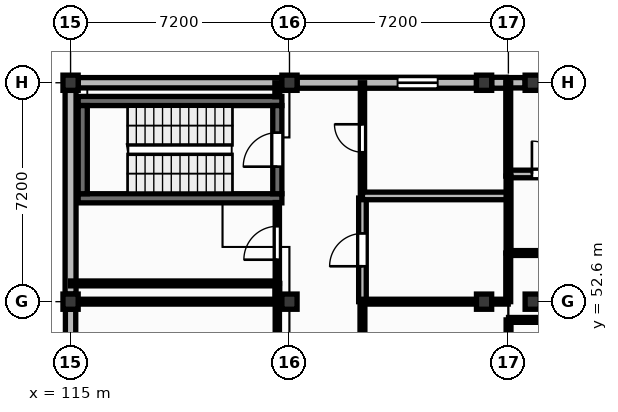
"""IFC4 building model, lengths in metres.
Left out: names, types, materials, properties, quantities, classifications, styles, units other than length and angle.
Written with IfcOpenShell. Run it as: python <this file> out.ifc"""

import sys

from ifc_helpers import new_model, si_unit, direction, frame, frame_2d, origin, origin_2d, place, context, subcontext, project, spatial, rectangle, extrude, element, fill, save


model = new_model("IFC4")
c1 = context("Model", 3, precision=1e-05, world=origin(), true_north=direction((0.0, 1.0)))
c2 = subcontext(c1, "Body", "Model", "MODEL_VIEW")
j1 = project(units=[si_unit("LENGTHUNIT", "METRE"), si_unit("PLANEANGLEUNIT", "RADIAN")], contexts=[c1])
p1 = place(None, origin())
s1 = spatial("IfcSite", under=j1, at=p1, CompositionType="ELEMENT")
p2 = place(p1, origin())
s2 = spatial("IfcBuilding", under=s1, at=p2, CompositionType="ELEMENT")
p3 = place(p2, frame((0.0, 0.0, 4.5)))
s3 = spatial("IfcBuildingStorey", under=s2, at=p3, CompositionType="ELEMENT", Elevation=4.5)
for number, where, z_axis, x_axis in (
    (1, (115.0, 52.6, 0.0), (0.0, 0.0, 1.0), (1.0, 0.0, 0.0)),
    (2, (115.0, 59.8, 0.0), (0.0, 0.0, 1.0), (1.0, 0.0, 0.0)),
    (3, (122.2, 52.6, 0.0), (0.0, 0.0, 1.0), (1.0, 0.0, 0.0)),
    (4, (122.2, 59.8, 0.0), (0.0, 0.0, 1.0), (1.0, 0.0, 0.0)),
    (5, (128.6, 52.6, 0.0), (0.0, 0.0, 1.0), (1.0, 0.0, 0.0)),
    (6, (128.6, 59.8, 0.0), (0.0, 0.0, 1.0), (1.0, 0.0, 0.0)),
    (7, (130.2, 52.6, 0.0), (0.0, 0.0, 1.0), (1.0, 0.0, 0.0)),
    (8, (130.2, 59.8, 0.0), (0.0, 0.0, 1.0), (1.0, 0.0, 0.0)),
):
    element("IfcColumn", number, at=place(p3, frame(where, z_axis=z_axis, x_axis=x_axis)), inside=s3, PredefinedType="COLUMN", context=c2, shape_type="SweptSolid", body=[
        extrude(rectangle(XDim=0.5, YDim=0.5, at=origin_2d()), origin(), (0.0, 0.0, 1.0), 4.22),
    ])
p4 = place(p3, frame((115.0, 45.65, 0.0), z_axis=(0.0, 0.0, 1.0), x_axis=(0.0, 1.0, 0.0)))
e9 = element("IfcWall", 9, at=p4, inside=s3, PredefinedType="SOLIDWALL", context=c2, shape_type="SweptSolid", body=[
    extrude(rectangle(XDim=6.7, YDim=0.34, at=frame_2d((3.35, 0.0))), origin(), (0.0, 0.0, 1.0), 3.52),
])
p5 = place(p4, frame((0.863, 0.0, 1.5)))
e10 = element("IfcOpeningElement", 10, at=p5, cuts=e9, PredefinedType="OPENING", context=c2, shape_type="SweptSolid", body=[
    extrude(rectangle(XDim=1.32, YDim=1.25, at=frame_2d((0.66, 0.625))), frame((0.0, 0.18, 0.0), z_axis=(0.0, -1.0, 0.0), x_axis=(1.0, 0.0, 0.0)), (0.0, 0.0, 1.0), 0.36),
])
p6 = place(p4, frame((3.703, 0.0, 1.05)))
e11 = element("IfcOpeningElement", 11, at=p6, cuts=e9, PredefinedType="OPENING", context=c2, shape_type="SweptSolid", body=[
    extrude(rectangle(XDim=2.1, YDim=1.65, at=frame_2d((1.05, 0.825))), frame((0.0, 0.18, 0.0), z_axis=(0.0, -1.0, 0.0), x_axis=(1.0, 0.0, 0.0)), (0.0, 0.0, 1.0), 0.36),
])
p7 = place(p3, frame((115.25, 59.8, 0.0), z_axis=(0.0, 0.0, 1.0), x_axis=(1.0, 0.0, 0.0)))
e12 = element("IfcWall", 12, at=p7, inside=s3, PredefinedType="SOLIDWALL", context=c2, shape_type="SweptSolid", body=[
    extrude(rectangle(XDim=6.7, YDim=0.34, at=frame_2d((3.35, 0.0))), origin(), (0.0, 0.0, 1.0), 3.52),
])
p8 = place(p3, frame((115.0, 52.85, 0.0), z_axis=(0.0, 0.0, 1.0), x_axis=(0.0, 1.0, 0.0)))
e13 = element("IfcWall", 13, at=p8, inside=s3, PredefinedType="SOLIDWALL", context=c2, shape_type="SweptSolid", body=[
    extrude(rectangle(XDim=6.7, YDim=0.36, at=frame_2d((3.35, 0.0))), origin(), (0.0, 0.0, 1.0), 3.52),
])
p9 = place(p3, frame((122.45, 59.8, 0.0), z_axis=(0.0, 0.0, 1.0), x_axis=(1.0, 0.0, 0.0)))
e14 = element("IfcWall", 14, at=p9, inside=s3, PredefinedType="SOLIDWALL", context=c2, shape_type="SweptSolid", body=[
    extrude(rectangle(XDim=5.9, YDim=0.36, at=frame_2d((2.95, 0.0))), origin(), (0.0, 0.0, 1.0), 3.52),
])
p10 = place(p9, frame((3.305, 0.0, 1.5)))
e15 = element("IfcOpeningElement", 15, at=p10, cuts=e14, PredefinedType="OPENING", context=c2, shape_type="SweptSolid", body=[
    extrude(rectangle(XDim=1.32, YDim=1.25, at=frame_2d((0.66, 0.625))), frame((0.0, 0.19, 0.0), z_axis=(0.0, -1.0, 0.0), x_axis=(1.0, 0.0, 0.0)), (0.0, 0.0, 1.0), 0.38),
])
p11 = place(p3, frame((128.85, 59.8, 0.0), z_axis=(0.0, 0.0, 1.0), x_axis=(1.0, 0.0, 0.0)))
e16 = element("IfcWall", 16, at=p11, inside=s3, PredefinedType="SOLIDWALL", context=c2, shape_type="SweptSolid", body=[
    extrude(rectangle(XDim=0.485, YDim=0.36, at=frame_2d((0.242, 0.0))), origin(), (0.0, 0.0, 1.0), 4.22),
])
p12 = place(p3, frame((129.405, 59.8, 0.0), z_axis=(0.0, 0.0, 1.0), x_axis=(1.0, 0.0, 0.0)))
e17 = element("IfcWall", 17, at=p12, inside=s3, PredefinedType="SOLIDWALL", context=c2, shape_type="SweptSolid", body=[
    extrude(rectangle(XDim=0.545, YDim=0.34, at=frame_2d((0.272, 0.0))), origin(), (0.0, 0.0, 1.0), 4.22),
])
for number, where, z_axis, x_axis in (
    (18, (115.25, 56.0, 0.0), (0.0, 0.0, 1.0), (1.0, 0.0, 0.0)),
    (19, (115.25, 59.2, 0.0), (0.0, 0.0, 1.0), (1.0, 0.0, 0.0)),
):
    element("IfcWall", number, at=place(p3, frame(where, z_axis=z_axis, x_axis=x_axis)), inside=s3, PredefinedType="SHEAR", context=c2, shape_type="SweptSolid", body=[
        extrude(rectangle(XDim=6.7, YDim=0.3, at=frame_2d((3.35, 0.0))), origin(), (0.0, 0.0, 1.0), 4.25),
    ])
p13 = place(p3, frame((115.4, 56.15, 0.0), z_axis=(0.0, 0.0, 1.0), x_axis=(0.0, 1.0, 0.0)))
e20 = element("IfcWall", 20, at=p13, inside=s3, PredefinedType="SHEAR", context=c2, shape_type="SweptSolid", body=[
    extrude(rectangle(XDim=2.9, YDim=0.3, at=frame_2d((1.45, 0.0))), origin(), (0.0, 0.0, 1.0), 4.25),
])
p14 = place(p3, frame((121.8, 56.15, 0.0), z_axis=(0.0, 0.0, 1.0), x_axis=(0.0, 1.0, 0.0)))
e21 = element("IfcWall", 21, at=p14, inside=s3, PredefinedType="SHEAR", context=c2, shape_type="SweptSolid", body=[
    extrude(rectangle(XDim=2.9, YDim=0.3, at=frame_2d((1.45, 0.0))), origin(), (0.0, 0.0, 1.0), 4.25),
])
p15 = place(p14, frame((0.89, 0.0, 0.0)))
e22 = element("IfcOpeningElement", 22, at=p15, cuts=e21, PredefinedType="OPENING", context=c2, shape_type="SweptSolid", body=[
    extrude(rectangle(XDim=1.12, YDim=2.1, at=frame_2d((0.56, 1.05))), frame((0.0, 0.16, 0.0), z_axis=(0.0, -1.0, 0.0), x_axis=(1.0, 0.0, 0.0)), (0.0, 0.0, 1.0), 0.32),
])
p16 = place(p3, frame((121.8, 48.645, 0.0), z_axis=(0.0, 0.0, 1.0), x_axis=(0.0, 1.0, 0.0)))
e23 = element("IfcWall", 23, at=p16, inside=s3, PredefinedType="PARTITIONING", context=c2, shape_type="SweptSolid", body=[
    extrude(rectangle(XDim=3.955, YDim=0.14, at=frame_2d((1.978, 0.0))), origin(), (0.0, 0.0, 1.0), 4.18),
])
p17 = place(p16, frame((1.397, 0.0, 0.0)))
e24 = element("IfcOpeningElement", 24, at=p17, cuts=e23, PredefinedType="OPENING", context=c2, shape_type="SweptSolid", body=[
    extrude(rectangle(XDim=1.16, YDim=2.1, at=frame_2d((0.58, 1.05))), frame((0.0, 0.08, 0.0), z_axis=(0.0, -1.0, 0.0), x_axis=(1.0, 0.0, 0.0)), (0.0, 0.0, 1.0), 0.16),
])
p18 = place(p3, frame((121.8, 53.2, 0.0), z_axis=(0.0, 0.0, 1.0), x_axis=(0.0, 1.0, 0.0)))
e25 = element("IfcWall", 25, at=p18, inside=s3, PredefinedType="PARTITIONING", context=c2, shape_type="SweptSolid", body=[
    extrude(rectangle(XDim=2.66, YDim=0.14, at=frame_2d((1.33, 0.0))), origin(), (0.0, 0.0, 1.0), 4.18),
])
p19 = place(p18, frame((0.78, 0.0, 0.0)))
e26 = element("IfcOpeningElement", 26, at=p19, cuts=e25, PredefinedType="OPENING", context=c2, shape_type="SweptSolid", body=[
    extrude(rectangle(XDim=1.1, YDim=2.1, at=frame_2d((0.55, 1.05))), frame((0.0, 0.08, 0.0), z_axis=(0.0, -1.0, 0.0), x_axis=(1.0, 0.0, 0.0)), (0.0, 0.0, 1.0), 0.16),
])
p20 = place(p3, frame((124.6, 52.6, 0.0), z_axis=(0.0, 0.0, 1.0), x_axis=(0.0, 1.0, 0.0)))
e27 = element("IfcWall", 27, at=p20, inside=s3, PredefinedType="SOLIDWALL", context=c2, shape_type="SweptSolid", body=[
    extrude(rectangle(XDim=3.408, YDim=0.25, at=frame_2d((1.704, 0.0))), origin(), (0.0, 0.0, 1.0), 4.18),
])
p21 = place(p20, frame((1.164, 0.0, 0.0)))
e28 = element("IfcOpeningElement", 28, at=p21, cuts=e27, PredefinedType="OPENING", context=c2, shape_type="SweptSolid", body=[
    extrude(rectangle(XDim=1.08, YDim=2.15, at=frame_2d((0.54, 1.075))), frame((0.0, 0.135, 0.0), z_axis=(0.0, -1.0, 0.0), x_axis=(1.0, 0.0, 0.0)), (0.0, 0.0, 1.0), 0.27),
])
p22 = place(p3, frame((124.6, 56.148, 0.0), z_axis=(0.0, 0.0, 1.0), x_axis=(0.0, 1.0, 0.0)))
e29 = element("IfcWall", 29, at=p22, inside=s3, PredefinedType="PARTITIONING", context=c2, shape_type="SweptSolid", body=[
    extrude(rectangle(XDim=3.652, YDim=0.14, at=frame_2d((1.826, 0.0))), origin(), (0.0, 0.0, 1.0), 4.18),
])
p23 = place(p22, frame((1.366, 0.0, 0.0)))
e30 = element("IfcOpeningElement", 30, at=p23, cuts=e29, PredefinedType="OPENING", context=c2, shape_type="SweptSolid", body=[
    extrude(rectangle(XDim=0.92, YDim=2.1, at=frame_2d((0.46, 1.05))), frame((0.0, 0.08, 0.0), z_axis=(0.0, -1.0, 0.0), x_axis=(1.0, 0.0, 0.0)), (0.0, 0.0, 1.0), 0.16),
])
p24 = place(p3, frame((124.6, 56.078, 0.0), z_axis=(0.0, 0.0, 1.0), x_axis=(1.0, 0.0, 0.0)))
e31 = element("IfcWall", 31, at=p24, inside=s3, PredefinedType="SOLIDWALL", context=c2, shape_type="SweptSolid", body=[
    extrude(rectangle(XDim=4.795, YDim=0.25, at=frame_2d((2.397, 0.0))), origin(), (0.0, 0.0, 1.0), 4.18),
])
p25 = place(p3, frame((129.405, 56.8, 0.0), z_axis=(0.0, 0.0, 1.0), x_axis=(1.0, 0.0, 0.0)))
e32 = element("IfcWall", 32, at=p25, inside=s3, PredefinedType="SOLIDWALL", context=c2, shape_type="SweptSolid", body=[
    extrude(rectangle(XDim=2.619, YDim=0.25, at=frame_2d((1.31, 0.0))), origin(), (0.0, 0.0, 1.0), 4.18),
])
p26 = place(p25, frame((0.77, 0.0, 0.0)))
e33 = element("IfcOpeningElement", 33, at=p26, cuts=e32, PredefinedType="OPENING", context=c2, shape_type="SweptSolid", body=[
    extrude(rectangle(XDim=1.08, YDim=2.15, at=frame_2d((0.54, 1.075))), frame((0.0, 0.135, 0.0), z_axis=(0.0, -1.0, 0.0), x_axis=(1.0, 0.0, 0.0)), (0.0, 0.0, 1.0), 0.27),
])
p27 = place(p3, frame((124.6, 50.6, 0.0), z_axis=(0.0, 0.0, 1.0), x_axis=(0.0, 1.0, 0.0)))
e34 = element("IfcWall", 34, at=p27, inside=s3, PredefinedType="PARTITIONING", context=c2, shape_type="SweptSolid", body=[
    extrude(rectangle(XDim=2.0, YDim=0.16, at=frame_2d((1.0, 0.0))), origin(), (0.0, 0.0, 1.0), 4.18),
])
p28 = place(p3, frame((121.8, 59.34, 0.0), z_axis=(0.0, 0.0, 1.0), x_axis=(0.0, 1.0, 0.0)))
e35 = element("IfcWall", 35, at=p28, inside=s3, PredefinedType="PARTITIONING", context=c2, shape_type="SweptSolid", body=[
    extrude(rectangle(XDim=0.46, YDim=0.16, at=frame_2d((0.23, 0.0))), origin(), (0.0, 0.0, 1.0), 4.18),
])
p29 = place(p3, frame((121.8, 52.6, 0.0), z_axis=(0.0, 0.0, 1.0), x_axis=(0.0, 1.0, 0.0)))
e36 = element("IfcWall", 36, at=p29, inside=s3, PredefinedType="PARTITIONING", context=c2, shape_type="SweptSolid", body=[
    extrude(rectangle(XDim=0.6, YDim=0.16, at=frame_2d((0.3, 0.0))), origin(), (0.0, 0.0, 1.0), 4.18),
])
p30 = place(p3, frame((115.0, 53.2, 0.0), z_axis=(0.0, 0.0, 1.0), x_axis=(1.0, 0.0, 0.0)))
e37 = element("IfcWall", 37, at=p30, inside=s3, PredefinedType="PARTITIONING", context=c2, shape_type="SweptSolid", body=[
    extrude(rectangle(XDim=6.8, YDim=0.16, at=frame_2d((3.4, 0.0))), origin(), (0.0, 0.0, 1.0), 4.18),
])
p31 = place(p3, frame((133.8, 52.0, 0.0), z_axis=(0.0, 0.0, 1.0), x_axis=(-1.0, 0.0, 0.0)))
e38 = element("IfcWall", 38, at=p31, inside=s3, PredefinedType="PARTITIONING", context=c2, shape_type="SweptSolid", body=[
    extrude(rectangle(XDim=4.395, YDim=0.16, at=frame_2d((2.198, 0.0))), origin(), (0.0, 0.0, 1.0), 4.18),
])
p32 = place(p3, frame((129.405, 50.6, 0.0), z_axis=(0.0, 0.0, 1.0), x_axis=(0.0, 1.0, 0.0)))
e39 = element("IfcWall", 39, at=p32, inside=s3, PredefinedType="PARTITIONING", context=c2, shape_type="SweptSolid", body=[
    extrude(rectangle(XDim=1.4, YDim=0.16, at=frame_2d((0.7, 0.0))), origin(), (0.0, 0.0, 1.0), 4.18),
])
p33 = place(p3, frame((129.405, 54.2, 0.0), z_axis=(0.0, 0.0, 1.0), x_axis=(1.0, 0.0, 0.0)))
e40 = element("IfcWall", 40, at=p33, inside=s3, PredefinedType="PARTITIONING", context=c2, shape_type="SweptSolid", body=[
    extrude(rectangle(XDim=4.395, YDim=0.16, at=frame_2d((2.198, 0.0))), origin(), (0.0, 0.0, 1.0), 4.18),
])
p34 = place(p3, frame((129.405, 54.2, 0.0), z_axis=(0.0, 0.0, 1.0), x_axis=(0.0, 1.0, 0.0)))
e41 = element("IfcWall", 41, at=p34, inside=s3, PredefinedType="PARTITIONING", context=c2, shape_type="SweptSolid", body=[
    extrude(rectangle(XDim=2.53, YDim=0.16, at=frame_2d((1.265, 0.0))), origin(), (0.0, 0.0, 1.0), 4.18),
])
p35 = place(p3, frame((121.8, 52.6, 0.0), z_axis=(0.0, 0.0, 1.0), x_axis=(-1.0, 0.0, 0.0)))
e42 = element("IfcWall", 42, at=p35, inside=s3, PredefinedType="PARTITIONING", context=c2, shape_type="SweptSolid", body=[
    extrude(rectangle(XDim=6.55, YDim=0.16, at=frame_2d((3.275, 0.0))), origin(), (0.0, 0.0, 1.0), 3.52),
])
p36 = place(p3, frame((124.6, 52.6, 0.0), z_axis=(0.0, 0.0, 1.0), x_axis=(1.0, 0.0, 0.0)))
e43 = element("IfcWall", 43, at=p36, inside=s3, PredefinedType="PARTITIONING", context=c2, shape_type="SweptSolid", body=[
    extrude(rectangle(XDim=3.75, YDim=0.16, at=frame_2d((1.875, 0.0))), origin(), (0.0, 0.0, 1.0), 3.52),
])
p37 = place(p3, frame((128.85, 52.6, 0.0), z_axis=(0.0, 0.0, 1.0), x_axis=(1.0, 0.0, 0.0)))
e44 = element("IfcWall", 44, at=p37, inside=s3, PredefinedType="PARTITIONING", context=c2, shape_type="SweptSolid", body=[
    extrude(rectangle(XDim=0.545, YDim=0.16, at=frame_2d((0.272, 0.0))), origin(), (0.0, 0.0, 1.0), 4.18),
])
p38 = place(p3, frame((129.395, 52.6, 0.0), z_axis=(0.0, 0.0, 1.0), x_axis=(0.0, 1.0, 0.0)))
e45 = element("IfcWall", 45, at=p38, inside=s3, PredefinedType="PARTITIONING", context=c2, shape_type="SweptSolid", body=[
    extrude(rectangle(XDim=1.6, YDim=0.16, at=frame_2d((0.8, 0.0))), origin(), (0.0, 0.0, 1.0), 4.18),
])
p39 = place(p3, frame((129.395, 56.73, 0.0), z_axis=(0.0, 0.0, 1.0), x_axis=(0.0, 1.0, 0.0)))
e46 = element("IfcWall", 46, at=p39, inside=s3, PredefinedType="PARTITIONING", context=c2, shape_type="SweptSolid", body=[
    extrude(rectangle(XDim=3.07, YDim=0.16, at=frame_2d((1.535, 0.0))), origin(), (0.0, 0.0, 1.0), 4.18),
])
p40 = place(p10, origin())
e47 = element("IfcWindow", 47, at=p40, inside=s3, PartitioningType="SINGLE_PANEL", PredefinedType="WINDOW", context=c2, shape_type="SweptSolid", body=[
    extrude(rectangle(XDim=1.32, YDim=1.25, at=frame_2d((0.66, 0.625))), frame((0.0, 0.03, 0.0), z_axis=(0.0, -1.0, 0.0), x_axis=(1.0, 0.0, 0.0)), (0.0, 0.0, 1.0), 0.06),
])
fill(e15, e47)
p41 = place(p15, origin())
e48 = element("IfcDoor", 48, at=p41, inside=s3, OperationType="SINGLE_SWING_LEFT", PredefinedType="DOOR", context=c2, shape_type="SweptSolid", body=[
    extrude(rectangle(XDim=1.12, YDim=2.1, at=frame_2d((0.56, 1.05))), frame((0.0, 0.025, 0.0), z_axis=(0.0, -1.0, 0.0), x_axis=(1.0, 0.0, 0.0)), (0.0, 0.0, 1.0), 0.05),
])
fill(e22, e48)
p42 = place(p19, origin())
e49 = element("IfcDoor", 49, at=p42, inside=s3, OperationType="SINGLE_SWING_LEFT", PredefinedType="DOOR", context=c2, shape_type="SweptSolid", body=[
    extrude(rectangle(XDim=1.1, YDim=2.1, at=frame_2d((0.55, 1.05))), frame((0.0, 0.025, 0.0), z_axis=(0.0, -1.0, 0.0), x_axis=(1.0, 0.0, 0.0)), (0.0, 0.0, 1.0), 0.05),
])
fill(e26, e49)
p43 = place(p21, origin())
e50 = element("IfcDoor", 50, at=p43, inside=s3, OperationType="SINGLE_SWING_LEFT", PredefinedType="DOOR", context=c2, shape_type="SweptSolid", body=[
    extrude(rectangle(XDim=1.08, YDim=2.15, at=frame_2d((0.54, 1.075))), frame((0.0, 0.025, 0.0), z_axis=(0.0, -1.0, 0.0), x_axis=(1.0, 0.0, 0.0)), (0.0, 0.0, 1.0), 0.05),
])
fill(e28, e50)
p44 = place(p23, origin())
e51 = element("IfcDoor", 51, at=p44, inside=s3, OperationType="SINGLE_SWING_RIGHT", PredefinedType="DOOR", context=c2, shape_type="SweptSolid", body=[
    extrude(rectangle(XDim=0.92, YDim=2.1, at=frame_2d((0.46, 1.05))), frame((0.0, 0.025, 0.0), z_axis=(0.0, -1.0, 0.0), x_axis=(1.0, 0.0, 0.0)), (0.0, 0.0, 1.0), 0.05),
])
fill(e30, e51)
p45 = place(p26, origin())
e52 = element("IfcDoor", 52, at=p45, inside=s3, OperationType="SINGLE_SWING_LEFT", PredefinedType="DOOR", context=c2, shape_type="SweptSolid", body=[
    extrude(rectangle(XDim=1.08, YDim=2.15, at=frame_2d((0.54, 1.075))), frame((0.0, 0.025, 0.0), z_axis=(0.0, -1.0, 0.0), x_axis=(1.0, 0.0, 0.0)), (0.0, 0.0, 1.0), 0.05),
])
fill(e33, e52)
save(model, sys.argv[1])
